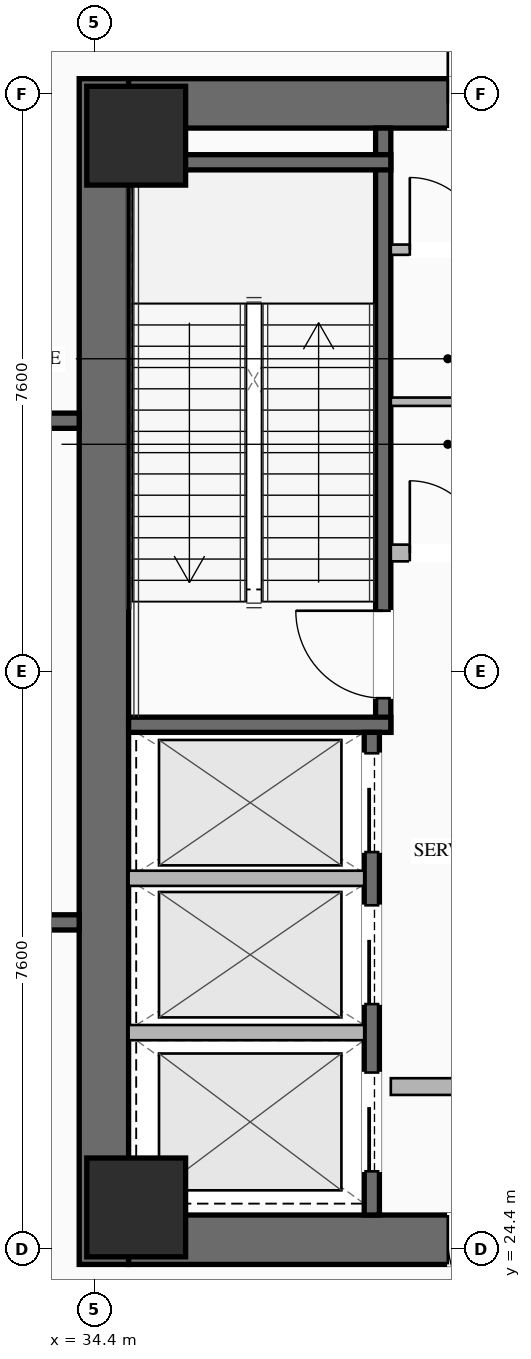
"""IFC4 building model, lengths in metres.
Left out: names, types, materials, properties, quantities, classifications, styles, units other than length and angle.
Written with IfcOpenShell. Run it as: python <this file> out.ifc"""

import sys

from ifc_helpers import new_model, si_unit, direction, frame, frame_2d, origin, origin_2d, place, context, subcontext, project, spatial, rectangle, hollow_rectangle, extrude, element, fill, save


model = new_model("IFC4")
c1 = context("Model", 3, precision=1e-05, world=origin(), true_north=direction((0.0, 1.0)))
c2 = subcontext(c1, "Body", "Model", "MODEL_VIEW")
j1 = project(units=[si_unit("LENGTHUNIT", "METRE"), si_unit("PLANEANGLEUNIT", "RADIAN")], contexts=[c1])
p1 = place(None, origin())
s1 = spatial("IfcSite", under=j1, at=p1, CompositionType="ELEMENT")
p2 = place(p1, origin())
s2 = spatial("IfcBuilding", under=s1, at=p2, CompositionType="ELEMENT")
p3 = place(p2, frame((0.0, 0.0, -5.5)))
s3 = spatial("IfcBuildingStorey", under=s2, at=p3, CompositionType="ELEMENT", Elevation=-5.5)
p4 = place(p3, frame((34.525, 24.2, 0.0), z_axis=(0.0, 0.0, 1.0), x_axis=(0.0, 1.0, 0.0)))
e1 = element("IfcWall", 1, at=p4, inside=s3, PredefinedType="SHEAR", context=c2, shape_type="SweptSolid", body=[
    extrude(rectangle(XDim=15.6, YDim=0.65, at=frame_2d((7.8, 0.0))), origin(), (0.0, 0.0, 1.0), 5.5),
])
p5 = place(p3, frame((49.15, 24.525, 0.0), z_axis=(0.0, 0.0, 1.0), x_axis=(-1.0, 0.0, 0.0)))
e2 = element("IfcWall", 2, at=p5, inside=s3, PredefinedType="SHEAR", context=c2, shape_type="SweptSolid", body=[
    extrude(rectangle(XDim=14.3, YDim=0.65, at=frame_2d((7.15, 0.0))), origin(), (0.0, 0.0, 1.0), 5.5),
])
p6 = place(p5, frame((8.85, 0.0, 0.0)))
e3 = element("IfcOpeningElement", 3, at=p6, cuts=e2, PredefinedType="OPENING", context=c2, shape_type="SweptSolid", body=[
    extrude(rectangle(XDim=1.25, YDim=2.25, at=frame_2d((0.625, 1.125))), frame((0.0, 0.335, 0.0), z_axis=(0.0, -1.0, 0.0), x_axis=(1.0, 0.0, 0.0)), (0.0, 0.0, 1.0), 0.67),
])
p7 = place(p5, frame((3.8, 0.0, 0.0)))
e4 = element("IfcOpeningElement", 4, at=p7, cuts=e2, PredefinedType="OPENING", context=c2, shape_type="SweptSolid", body=[
    extrude(rectangle(XDim=1.25, YDim=2.25, at=frame_2d((0.625, 1.125))), frame((0.0, 0.335, 0.0), z_axis=(0.0, -1.0, 0.0), x_axis=(1.0, 0.0, 0.0)), (0.0, 0.0, 1.0), 0.67),
])
p8 = place(p3, frame((34.85, 39.475, 0.0), z_axis=(0.0, 0.0, 1.0), x_axis=(1.0, 0.0, 0.0)))
e5 = element("IfcWall", 5, at=p8, inside=s3, PredefinedType="SHEAR", context=c2, shape_type="SweptSolid", body=[
    extrude(rectangle(XDim=14.3, YDim=0.65, at=frame_2d((7.15, 0.0))), origin(), (0.0, 0.0, 1.0), 5.5),
])
p9 = place(p8, frame((4.2, 0.0, 0.0)))
e6 = element("IfcOpeningElement", 6, at=p9, cuts=e5, PredefinedType="OPENING", context=c2, shape_type="SweptSolid", body=[
    extrude(rectangle(XDim=1.25, YDim=2.25, at=frame_2d((0.625, 1.125))), frame((0.0, 0.335, 0.0), z_axis=(0.0, -1.0, 0.0), x_axis=(1.0, 0.0, 0.0)), (0.0, 0.0, 1.0), 0.67),
])
p10 = place(p8, frame((9.25, 0.0, 0.0)))
e7 = element("IfcOpeningElement", 7, at=p10, cuts=e5, PredefinedType="OPENING", context=c2, shape_type="SweptSolid", body=[
    extrude(rectangle(XDim=1.25, YDim=2.25, at=frame_2d((0.625, 1.125))), frame((0.0, 0.335, 0.0), z_axis=(0.0, -1.0, 0.0), x_axis=(1.0, 0.0, 0.0)), (0.0, 0.0, 1.0), 0.67),
])
for number, where, z_axis, x_axis in (
    (8, (34.95, 24.95, 0.0), (0.0, 0.0, 1.0), (1.0, 0.0, 0.0)),
    (9, (34.95, 39.05, 0.0), (0.0, 0.0, 1.0), (1.0, 0.0, 0.0)),
):
    element("IfcColumn", number, at=place(p3, frame(where, z_axis=z_axis, x_axis=x_axis)), inside=s3, PredefinedType="COLUMN", context=c2, shape_type="SweptSolid", body=[
        extrude(hollow_rectangle(XDim=1.3, YDim=1.3, WallThickness=0.05, at=origin_2d()), origin(), (0.0, 0.0, 1.0), 5.2),
    ])
p11 = place(p3, frame((38.2, 31.2, 0.0), z_axis=(0.0, 0.0, 1.0), x_axis=(0.0, 1.0, 0.0)))
e10 = element("IfcWall", 10, at=p11, inside=s3, PredefinedType="SHEAR", context=c2, shape_type="SweptSolid", body=[
    extrude(rectangle(XDim=7.95, YDim=0.2, at=frame_2d((3.975, 0.0))), origin(), (0.0, 0.0, 1.0), 5.2),
])
p12 = place(p11, frame((0.45, 0.0, 0.0)))
e11 = element("IfcOpeningElement", 11, at=p12, cuts=e10, PredefinedType="OPENING", context=c2, shape_type="SweptSolid", body=[
    extrude(rectangle(XDim=1.15, YDim=2.2, at=frame_2d((0.575, 1.1))), frame((0.0, 0.11, 0.0), z_axis=(0.0, -1.0, 0.0), x_axis=(1.0, 0.0, 0.0)), (0.0, 0.0, 1.0), 0.22),
])
for number, where, z_axis, x_axis in (
    (12, (34.85, 31.3, 0.0), (0.0, 0.0, 1.0), (1.0, 0.0, 0.0)),
    (13, (34.85, 38.7, 0.0), (0.0, 0.0, 1.0), (1.0, 0.0, 0.0)),
):
    element("IfcWall", number, at=place(p3, frame(where, z_axis=z_axis, x_axis=x_axis)), inside=s3, PredefinedType="SHEAR", context=c2, shape_type="SweptSolid", body=[
        extrude(rectangle(XDim=3.45, YDim=0.2, at=frame_2d((1.725, 0.0))), origin(), (0.0, 0.0, 1.0), 5.2),
    ])
p13 = place(p3, frame((38.3, 33.56, 0.0), z_axis=(0.0, 0.0, 1.0), x_axis=(1.0, 0.0, 0.0)))
e14 = element("IfcWall", 14, at=p13, inside=s3, PredefinedType="SOLIDWALL", context=c2, shape_type="SweptSolid", body=[
    extrude(rectangle(XDim=3.15, YDim=0.22, at=frame_2d((1.575, 0.0))), origin(), (0.0, 0.0, 1.0), 4.243),
])
p14 = place(p13, frame((0.25, 0.0, 0.0)))
e15 = element("IfcOpeningElement", 15, at=p14, cuts=e14, PredefinedType="OPENING", context=c2, shape_type="SweptSolid", body=[
    extrude(rectangle(XDim=0.95, YDim=2.05, at=frame_2d((0.475, 1.025))), frame((0.0, 0.12, 0.0), z_axis=(0.0, -1.0, 0.0), x_axis=(1.0, 0.0, 0.0)), (0.0, 0.0, 1.0), 0.24),
])
p15 = place(p13, frame((1.95, 0.0, 0.0)))
e16 = element("IfcOpeningElement", 16, at=p15, cuts=e14, PredefinedType="OPENING", context=c2, shape_type="SweptSolid", body=[
    extrude(rectangle(XDim=0.95, YDim=2.05, at=frame_2d((0.475, 1.025))), frame((0.0, 0.12, 0.0), z_axis=(0.0, -1.0, 0.0), x_axis=(1.0, 0.0, 0.0)), (0.0, 0.0, 1.0), 0.24),
])
p16 = place(p3, frame((38.3, 26.54, 0.0), z_axis=(0.0, 0.0, 1.0), x_axis=(1.0, 0.0, 0.0)))
e17 = element("IfcWall", 17, at=p16, inside=s3, PredefinedType="SOLIDWALL", context=c2, shape_type="SweptSolid", body=[
    extrude(rectangle(XDim=3.15, YDim=0.22, at=frame_2d((1.575, 0.0))), origin(), (0.0, 0.0, 1.0), 4.243),
])
p17 = place(p16, frame((0.95, 0.0, 0.0)))
e18 = element("IfcOpeningElement", 18, at=p17, cuts=e17, PredefinedType="OPENING", context=c2, shape_type="SweptSolid", body=[
    extrude(rectangle(XDim=1.25, YDim=2.25, at=frame_2d((0.625, 1.125))), frame((0.0, 0.12, 0.0), z_axis=(0.0, -1.0, 0.0), x_axis=(1.0, 0.0, 0.0)), (0.0, 0.0, 1.0), 0.24),
])
p18 = place(p3, frame((38.05, 24.85, 0.0), z_axis=(0.0, 0.0, 1.0), x_axis=(0.0, 1.0, 0.0)))
e19 = element("IfcWall", 19, at=p18, inside=s3, PredefinedType="SHEAR", context=c2, shape_type="SweptSolid", body=[
    extrude(rectangle(XDim=6.35, YDim=0.2, at=frame_2d((3.175, 0.0))), origin(), (0.0, 0.0, 1.0), 5.2),
])
p19 = place(p18, frame((4.775, 0.0, 0.0)))
e20 = element("IfcOpeningElement", 20, at=p19, cuts=e19, PredefinedType="OPENING", context=c2, shape_type="SweptSolid", body=[
    extrude(rectangle(XDim=1.3, YDim=2.25, at=frame_2d((0.65, 1.125))), frame((0.0, 0.11, 0.0), z_axis=(0.0, -1.0, 0.0), x_axis=(1.0, 0.0, 0.0)), (0.0, 0.0, 1.0), 0.22),
])
p20 = place(p18, frame((2.775, 0.0, 0.0)))
e21 = element("IfcOpeningElement", 21, at=p20, cuts=e19, PredefinedType="OPENING", context=c2, shape_type="SweptSolid", body=[
    extrude(rectangle(XDim=1.3, YDim=2.25, at=frame_2d((0.65, 1.125))), frame((0.0, 0.11, 0.0), z_axis=(0.0, -1.0, 0.0), x_axis=(1.0, 0.0, 0.0)), (0.0, 0.0, 1.0), 0.22),
])
p21 = place(p18, frame((0.575, 0.0, 0.0)))
e22 = element("IfcOpeningElement", 22, at=p21, cuts=e19, PredefinedType="OPENING", context=c2, shape_type="SweptSolid", body=[
    extrude(rectangle(XDim=1.3, YDim=2.25, at=frame_2d((0.65, 1.125))), frame((0.0, 0.11, 0.0), z_axis=(0.0, -1.0, 0.0), x_axis=(1.0, 0.0, 0.0)), (0.0, 0.0, 1.0), 0.22),
])
for number, where, z_axis, x_axis in (
    (23, (34.85, 27.25, 0.0), (0.0, 0.0, 1.0), (1.0, 0.0, 0.0)),
    (24, (34.85, 29.28, 0.0), (0.0, 0.0, 1.0), (1.0, 0.0, 0.0)),
):
    element("IfcWall", number, at=place(p3, frame(where, z_axis=z_axis, x_axis=x_axis)), inside=s3, PredefinedType="SOLIDWALL", context=c2, shape_type="SweptSolid", body=[
        extrude(rectangle(XDim=3.1, YDim=0.2, at=frame_2d((1.55, 0.0))), origin(), (0.0, 0.0, 1.0), 5.2),
    ])
p22 = place(p3, frame((38.3, 37.55, 0.0), z_axis=(0.0, 0.0, 1.0), x_axis=(1.0, 0.0, 0.0)))
e25 = element("IfcWall", 25, at=p22, inside=s3, PredefinedType="PARTITIONING", context=c2, shape_type="SweptSolid", body=[
    extrude(rectangle(XDim=3.15, YDim=0.135, at=frame_2d((1.575, 0.0))), origin(), (0.0, 0.0, 1.0), 4.243),
])
p23 = place(p22, frame((0.25, 0.0, 0.0)))
e26 = element("IfcOpeningElement", 26, at=p23, cuts=e25, PredefinedType="OPENING", context=c2, shape_type="SweptSolid", body=[
    extrude(rectangle(XDim=0.95, YDim=2.05, at=frame_2d((0.475, 1.025))), frame((0.0, 0.077, 0.0), z_axis=(0.0, -1.0, 0.0), x_axis=(1.0, 0.0, 0.0)), (0.0, 0.0, 1.0), 0.155),
])
p24 = place(p22, frame((1.95, 0.0, 0.0)))
e27 = element("IfcOpeningElement", 27, at=p24, cuts=e25, PredefinedType="OPENING", context=c2, shape_type="SweptSolid", body=[
    extrude(rectangle(XDim=0.95, YDim=2.05, at=frame_2d((0.475, 1.025))), frame((0.0, 0.077, 0.0), z_axis=(0.0, -1.0, 0.0), x_axis=(1.0, 0.0, 0.0)), (0.0, 0.0, 1.0), 0.155),
])
p25 = place(p3, frame((38.3, 35.55, 0.0), z_axis=(0.0, 0.0, 1.0), x_axis=(1.0, 0.0, 0.0)))
e28 = element("IfcWall", 28, at=p25, inside=s3, PredefinedType="PARTITIONING", context=c2, shape_type="SweptSolid", body=[
    extrude(rectangle(XDim=3.15, YDim=0.11, at=frame_2d((1.575, 0.0))), origin(), (0.0, 0.0, 1.0), 4.243),
])
for number, where, z_axis, x_axis in (
    (29, (30.8, 35.3, 0.0), (0.0, 0.0, 1.0), (1.0, 0.0, 0.0)),
    (30, (30.8, 28.7, 0.0), (0.0, 0.0, 1.0), (1.0, 0.0, 0.0)),
):
    element("IfcWall", number, at=place(p3, frame(where, z_axis=z_axis, x_axis=x_axis)), inside=s3, PredefinedType="SHEAR", context=c2, shape_type="SweptSolid", body=[
        extrude(rectangle(XDim=3.4, YDim=0.2, at=frame_2d((1.7, 0.0))), origin(), (0.0, 0.0, 1.0), 5.2),
    ])
p26 = place(p9, origin())
e31 = element("IfcDoor", 31, at=p26, inside=s3, OperationType="SINGLE_SWING_LEFT", PredefinedType="DOOR", context=c2, shape_type="SweptSolid", body=[
    extrude(rectangle(XDim=1.25, YDim=2.25, at=frame_2d((0.625, 1.125))), frame((0.0, 0.025, 0.0), z_axis=(0.0, -1.0, 0.0), x_axis=(1.0, 0.0, 0.0)), (0.0, 0.0, 1.0), 0.05),
])
fill(e6, e31)
p27 = place(p6, origin())
e32 = element("IfcDoor", 32, at=p27, inside=s3, OperationType="SINGLE_SWING_LEFT", PredefinedType="DOOR", context=c2, shape_type="SweptSolid", body=[
    extrude(rectangle(XDim=1.25, YDim=2.25, at=frame_2d((0.625, 1.125))), frame((0.0, 0.025, 0.0), z_axis=(0.0, -1.0, 0.0), x_axis=(1.0, 0.0, 0.0)), (0.0, 0.0, 1.0), 0.05),
])
fill(e3, e32)
p28 = place(p12, origin())
e33 = element("IfcDoor", 33, at=p28, inside=s3, OperationType="SINGLE_SWING_RIGHT", PredefinedType="DOOR", context=c2, shape_type="SweptSolid", body=[
    extrude(rectangle(XDim=1.15, YDim=2.2, at=frame_2d((0.575, 1.1))), frame((0.0, 0.025, 0.0), z_axis=(0.0, -1.0, 0.0), x_axis=(1.0, 0.0, 0.0)), (0.0, 0.0, 1.0), 0.05),
])
fill(e11, e33)
p29 = place(p23, origin())
e34 = element("IfcDoor", 34, at=p29, inside=s3, OperationType="SINGLE_SWING_LEFT", PredefinedType="DOOR", context=c2, shape_type="SweptSolid", body=[
    extrude(rectangle(XDim=0.95, YDim=2.05, at=frame_2d((0.475, 1.025))), frame((0.0, 0.025, 0.0), z_axis=(0.0, -1.0, 0.0), x_axis=(1.0, 0.0, 0.0)), (0.0, 0.0, 1.0), 0.05),
])
fill(e26, e34)
p30 = place(p14, origin())
e35 = element("IfcDoor", 35, at=p30, inside=s3, OperationType="SINGLE_SWING_LEFT", PredefinedType="DOOR", context=c2, shape_type="SweptSolid", body=[
    extrude(rectangle(XDim=0.95, YDim=2.05, at=frame_2d((0.475, 1.025))), frame((0.0, 0.025, 0.0), z_axis=(0.0, -1.0, 0.0), x_axis=(1.0, 0.0, 0.0)), (0.0, 0.0, 1.0), 0.05),
])
fill(e15, e35)
p31 = place(p19, origin())
e36 = element("IfcDoor", 36, at=p31, inside=s3, OperationType="SLIDING_TO_LEFT", PredefinedType="DOOR", context=c2, shape_type="SweptSolid", body=[
    extrude(rectangle(XDim=1.3, YDim=2.25, at=frame_2d((0.65, 1.125))), frame((0.0, 0.025, 0.0), z_axis=(0.0, -1.0, 0.0), x_axis=(1.0, 0.0, 0.0)), (0.0, 0.0, 1.0), 0.05),
])
fill(e20, e36)
p32 = place(p20, origin())
e37 = element("IfcDoor", 37, at=p32, inside=s3, OperationType="SLIDING_TO_LEFT", PredefinedType="DOOR", context=c2, shape_type="SweptSolid", body=[
    extrude(rectangle(XDim=1.3, YDim=2.25, at=frame_2d((0.65, 1.125))), frame((0.0, 0.025, 0.0), z_axis=(0.0, -1.0, 0.0), x_axis=(1.0, 0.0, 0.0)), (0.0, 0.0, 1.0), 0.05),
])
fill(e21, e37)
p33 = place(p21, origin())
e38 = element("IfcDoor", 38, at=p33, inside=s3, OperationType="SLIDING_TO_LEFT", PredefinedType="DOOR", context=c2, shape_type="SweptSolid", body=[
    extrude(rectangle(XDim=1.3, YDim=2.25, at=frame_2d((0.65, 1.125))), frame((0.0, 0.025, 0.0), z_axis=(0.0, -1.0, 0.0), x_axis=(1.0, 0.0, 0.0)), (0.0, 0.0, 1.0), 0.05),
])
fill(e22, e38)
save(model, sys.argv[1])
